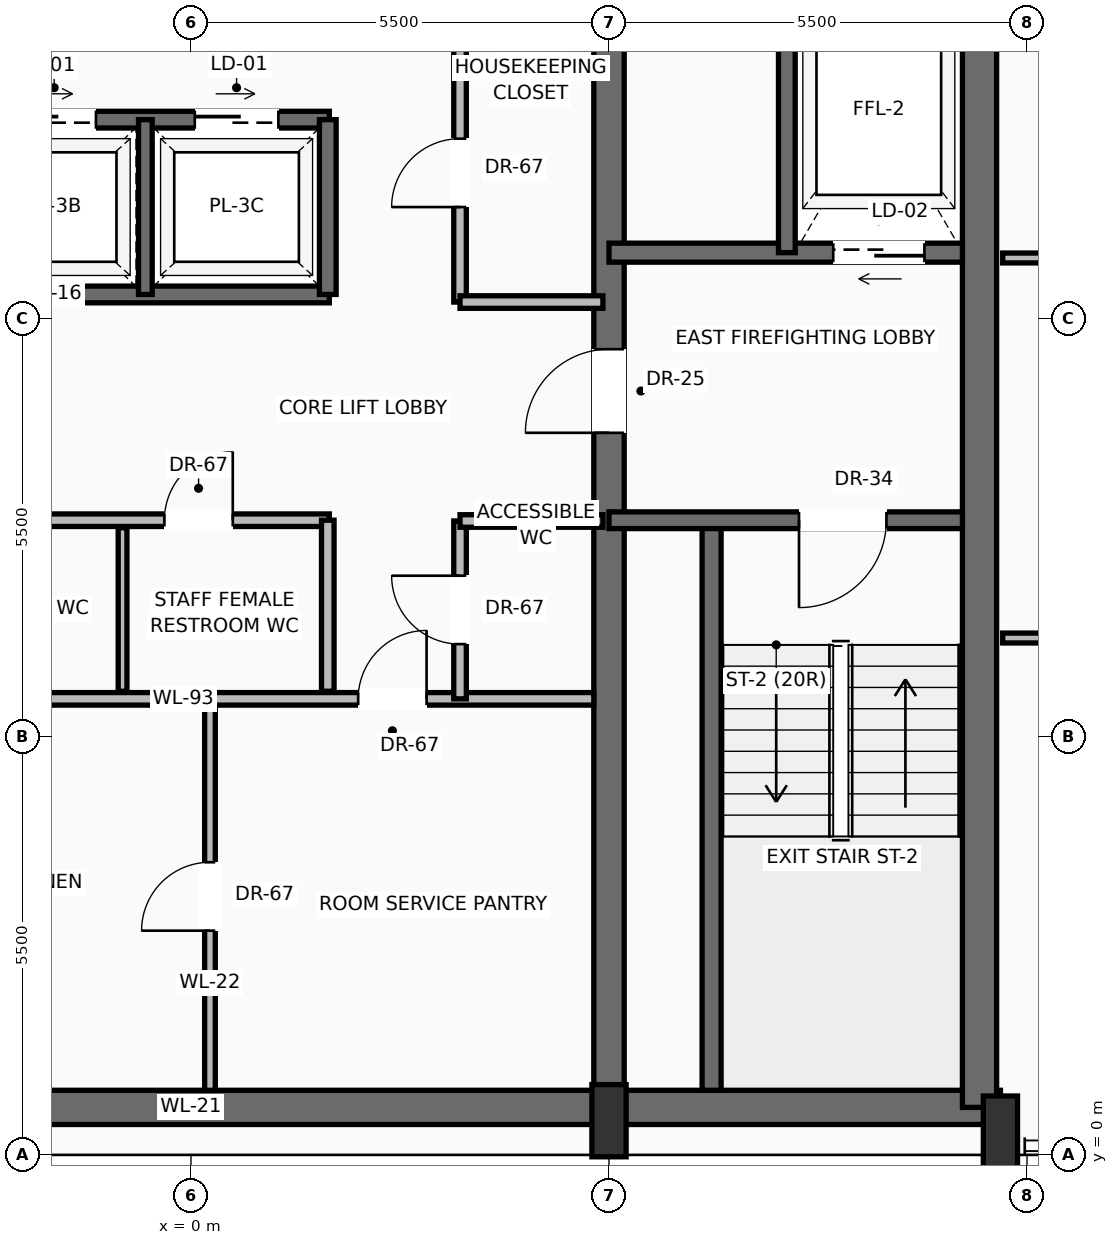
"""IFC4 building model, lengths in metres.
Left out: names, types, materials, properties, quantities, classifications, styles, units other than length and angle.
Written with IfcOpenShell. Run it as: python <this file> out.ifc"""

import sys

from ifc_helpers import new_model, si_unit, direction, frame, frame_2d, origin, origin_2d, place, context, subcontext, project, spatial, rectangle, extrude, source, transform, mapped, element, fill, save


model = new_model("IFC4")
c1 = context("Model", 3, precision=1e-05, world=origin(), true_north=direction((0.0, 1.0)))
c2 = subcontext(c1, "Body", "Model", "MODEL_VIEW")
j1 = project(units=[si_unit("LENGTHUNIT", "METRE"), si_unit("PLANEANGLEUNIT", "RADIAN")], contexts=[c1])
p1 = place(None, origin())
s1 = spatial("IfcSite", under=j1, at=p1, CompositionType="ELEMENT")
p2 = place(p1, origin())
s2 = spatial("IfcBuilding", under=s1, at=p2, CompositionType="ELEMENT")
p3 = place(p2, frame((0.0, 0.0, 286.8)))
s3 = spatial("IfcBuildingStorey", under=s2, at=p3, CompositionType="ELEMENT", Elevation=286.8)
p4 = place(p3, frame((-10.65, 0.625, 0.0), z_axis=(0.0, 0.0, 1.0), x_axis=(1.0, 0.0, 0.0)))
e1 = element("IfcWall", 1, at=p4, inside=s3, PredefinedType="SHEAR", context=c2, shape_type="SweptSolid", body=[
    extrude(rectangle(XDim=21.3, YDim=0.45, at=frame_2d((10.65, 0.0))), origin(), (0.0, 0.0, 1.0), 3.24),
])
p5 = place(p3, frame((10.375, 0.625, 0.0), z_axis=(0.0, 0.0, 1.0), x_axis=(0.0, 1.0, 0.0)))
e2 = element("IfcWall", 2, at=p5, inside=s3, PredefinedType="SHEAR", context=c2, shape_type="SweptSolid", body=[
    extrude(rectangle(XDim=15.35, YDim=0.45, at=frame_2d((7.675, 0.0))), origin(), (0.0, 0.0, 1.0), 3.24),
])
p6 = place(p3, frame((5.5, 0.625, 0.0), z_axis=(0.0, 0.0, 1.0), x_axis=(0.0, 1.0, 0.0)))
e3 = element("IfcWall", 3, at=p6, inside=s3, PredefinedType="SHEAR", context=c2, shape_type="SweptSolid", body=[
    extrude(rectangle(XDim=15.35, YDim=0.4, at=frame_2d((7.675, 0.0))), origin(), (0.0, 0.0, 1.0), 3.24),
])
p7 = place(p6, frame((8.875, 0.0, 0.0)))
e4 = element("IfcOpeningElement", 4, at=p7, cuts=e3, PredefinedType="OPENING", context=c2, shape_type="SweptSolid", body=[
    extrude(rectangle(XDim=1.1, YDim=2.2, at=frame_2d((0.55, 1.1))), frame((0.0, 0.21, 0.0), z_axis=(0.0, -1.0, 0.0), x_axis=(1.0, 0.0, 0.0)), (0.0, 0.0, 1.0), 0.42),
])
m1 = source(origin(), c2, "Body", "SweptSolid", [
    extrude(rectangle(XDim=0.45, YDim=0.95, at=origin_2d()), origin(), (0.0, 0.0, 1.0), 3.45),
])
for number, where, z_axis, x_axis in (
    (5, (5.5, 0.45, 0.0), (0.0, 0.0, 1.0), (1.0, 0.0, 0.0)),
    (6, (10.65, 0.3, 0.0), (0.0, 0.0, 1.0), (1.0, 0.0, 0.0)),
):
    element("IfcColumn", number, at=place(p3, frame(where, z_axis=z_axis, x_axis=x_axis)), inside=s3, PredefinedType="PILASTER", context=c2, shape_type="MappedRepresentation", body=[
        mapped(m1, transform((0.0, 0.0, 0.0), scale=1.0)),
    ])
p8 = place(p3, frame((7.708, 31.656, 0.0), z_axis=(0.0, 0.0, 1.0), x_axis=(0.504292445958, -0.86353293449, 0.0)))
e7 = element("IfcWall", 7, at=p8, inside=s3, PredefinedType="SOLIDWALL", context=c2, shape_type="SweptSolid", body=[
    extrude(rectangle(XDim=20.096, YDim=0.28, at=frame_2d((10.048, 0.0))), origin(), (0.0, 0.0, 1.0), 2.82),
])
p9 = place(p8, frame((4.823, 0.0, 0.0)))
e8 = element("IfcOpeningElement", 8, at=p9, cuts=e7, PredefinedType="OPENING", context=c2, shape_type="SweptSolid", body=[
    extrude(rectangle(XDim=1.6, YDim=2.35, at=frame_2d((0.8, 1.175))), frame((0.0, 0.15, 0.0), z_axis=(0.0, -1.0, 0.0), x_axis=(1.0, 0.0, 0.0)), (0.0, 0.0, 1.0), 0.3),
])
p10 = place(p8, frame((13.666, 0.0, 0.9)))
e9 = element("IfcOpeningElement", 9, at=p10, cuts=e7, PredefinedType="OPENING", context=c2, shape_type="SweptSolid", body=[
    extrude(rectangle(XDim=1.55, YDim=1.75, at=frame_2d((0.775, 0.875))), frame((0.0, 0.15, 0.0), z_axis=(0.0, -1.0, 0.0), x_axis=(1.0, 0.0, 0.0)), (0.0, 0.0, 1.0), 0.3),
])
p11 = place(p3, frame((6.85, 0.85, 0.0), z_axis=(0.0, 0.0, 1.0), x_axis=(0.0, 1.0, 0.0)))
e10 = element("IfcWall", 10, at=p11, inside=s3, PredefinedType="SOLIDWALL", context=c2, shape_type="SweptSolid", body=[
    extrude(rectangle(XDim=7.5, YDim=0.25, at=frame_2d((3.75, 0.0))), origin(), (0.0, 0.0, 1.0), 3.24),
])
p12 = place(p3, frame((10.15, 8.35, 0.0), z_axis=(0.0, 0.0, 1.0), x_axis=(-1.0, 0.0, 0.0)))
e11 = element("IfcWall", 11, at=p12, inside=s3, PredefinedType="SOLIDWALL", context=c2, shape_type="SweptSolid", body=[
    extrude(rectangle(XDim=4.65, YDim=0.22, at=frame_2d((2.325, 0.0))), origin(), (0.0, 0.0, 1.0), 3.24),
])
p13 = place(p12, frame((1.0, 0.0, 0.0)))
e12 = element("IfcOpeningElement", 12, at=p13, cuts=e11, PredefinedType="OPENING", context=c2, shape_type="SweptSolid", body=[
    extrude(rectangle(XDim=1.15, YDim=2.2, at=frame_2d((0.575, 1.1))), frame((0.0, 0.12, 0.0), z_axis=(0.0, -1.0, 0.0), x_axis=(1.0, 0.0, 0.0)), (0.0, 0.0, 1.0), 0.24),
])
p14 = place(p3, frame((10.15, 11.87, 0.0), z_axis=(0.0, 0.0, 1.0), x_axis=(-1.0, 0.0, 0.0)))
e13 = element("IfcWall", 13, at=p14, inside=s3, PredefinedType="SOLIDWALL", context=c2, shape_type="SweptSolid", body=[
    extrude(rectangle(XDim=4.65, YDim=0.25, at=frame_2d((2.325, 0.0))), origin(), (0.0, 0.0, 1.0), 3.24),
])
p15 = place(p14, frame((0.5, 0.0, 0.0)))
e14 = element("IfcOpeningElement", 14, at=p15, cuts=e13, PredefinedType="OPENING", context=c2, shape_type="SweptSolid", body=[
    extrude(rectangle(XDim=1.2, YDim=2.25, at=frame_2d((0.6, 1.125))), frame((0.0, 0.135, 0.0), z_axis=(0.0, -1.0, 0.0), x_axis=(1.0, 0.0, 0.0)), (0.0, 0.0, 1.0), 0.27),
])
p16 = place(p3, frame((7.84, 11.87, 0.0), z_axis=(0.0, 0.0, 1.0), x_axis=(0.0, 1.0, 0.0)))
e15 = element("IfcWall", 15, at=p16, inside=s3, PredefinedType="SOLIDWALL", context=c2, shape_type="SweptSolid", body=[
    extrude(rectangle(XDim=3.88, YDim=0.22, at=frame_2d((1.94, 0.0))), origin(), (0.0, 0.0, 1.0), 3.24),
])
p17 = place(p3, frame((-5.5, 6.0, 0.0), z_axis=(0.0, 0.0, 1.0), x_axis=(1.0, 0.0, 0.0)))
e16 = element("IfcWall", 16, at=p17, inside=s3, PredefinedType="PARTITIONING", context=c2, shape_type="SweptSolid", body=[
    extrude(rectangle(XDim=10.8, YDim=0.165, at=frame_2d((5.4, 0.0))), origin(), (0.0, 0.0, 1.0), 3.232),
])
p18 = place(p17, frame((7.7, 0.0, 0.0)))
e17 = element("IfcOpeningElement", 17, at=p18, cuts=e16, PredefinedType="OPENING", context=c2, shape_type="SweptSolid", body=[
    extrude(rectangle(XDim=0.9, YDim=2.1, at=frame_2d((0.45, 1.05))), frame((0.0, 0.093, 0.0), z_axis=(0.0, -1.0, 0.0), x_axis=(1.0, 0.0, 0.0)), (0.0, 0.0, 1.0), 0.185),
])
p19 = place(p3, frame((0.25, 0.85, 0.0), z_axis=(0.0, 0.0, 1.0), x_axis=(0.0, 1.0, 0.0)))
e18 = element("IfcWall", 18, at=p19, inside=s3, PredefinedType="PARTITIONING", context=c2, shape_type="SweptSolid", body=[
    extrude(rectangle(XDim=5.03, YDim=0.14, at=frame_2d((2.515, 0.0))), origin(), (0.0, 0.0, 1.0), 3.232),
])
p20 = place(p19, frame((2.1, 0.0, 0.0)))
e19 = element("IfcOpeningElement", 19, at=p20, cuts=e18, PredefinedType="OPENING", context=c2, shape_type="SweptSolid", body=[
    extrude(rectangle(XDim=0.9, YDim=2.1, at=frame_2d((0.45, 1.05))), frame((0.0, 0.08, 0.0), z_axis=(0.0, -1.0, 0.0), x_axis=(1.0, 0.0, 0.0)), (0.0, 0.0, 1.0), 0.16),
])
p21 = place(p3, frame((3.54, 6.0, 0.0), z_axis=(0.0, 0.0, 1.0), x_axis=(0.0, 1.0, 0.0)))
e20 = element("IfcWall", 20, at=p21, inside=s3, PredefinedType="PARTITIONING", context=c2, shape_type="SweptSolid", body=[
    extrude(rectangle(XDim=2.34, YDim=0.165, at=frame_2d((1.17, 0.0))), origin(), (0.0, 0.0, 1.0), 3.232),
])
p22 = place(p21, frame((0.72, 0.0, 0.0)))
e21 = element("IfcOpeningElement", 21, at=p22, cuts=e20, PredefinedType="OPENING", context=c2, shape_type="SweptSolid", body=[
    extrude(rectangle(XDim=0.9, YDim=2.1, at=frame_2d((0.45, 1.05))), frame((0.0, 0.093, 0.0), z_axis=(0.0, -1.0, 0.0), x_axis=(1.0, 0.0, 0.0)), (0.0, 0.0, 1.0), 0.185),
])
p23 = place(p3, frame((3.54, 8.34, 0.0), z_axis=(0.0, 0.0, 1.0), x_axis=(1.0, 0.0, 0.0)))
e22 = element("IfcWall", 22, at=p23, inside=s3, PredefinedType="PARTITIONING", context=c2, shape_type="SweptSolid", body=[
    extrude(rectangle(XDim=1.88, YDim=0.165, at=frame_2d((0.94, 0.0))), origin(), (0.0, 0.0, 1.0), 3.232),
])
p24 = place(p3, frame((-5.3, 8.35, 0.0), z_axis=(0.0, 0.0, 1.0), x_axis=(1.0, 0.0, 0.0)))
e23 = element("IfcWall", 23, at=p24, inside=s3, PredefinedType="PARTITIONING", context=c2, shape_type="SweptSolid", body=[
    extrude(rectangle(XDim=7.12, YDim=0.165, at=frame_2d((3.56, 0.0))), origin(), (0.0, 0.0, 1.0), 3.232),
])
p25 = place(p24, frame((0.85, 0.0, 0.0)))
e24 = element("IfcOpeningElement", 24, at=p25, cuts=e23, PredefinedType="OPENING", context=c2, shape_type="SweptSolid", body=[
    extrude(rectangle(XDim=0.9, YDim=2.1, at=frame_2d((0.45, 1.05))), frame((0.0, 0.093, 0.0), z_axis=(0.0, -1.0, 0.0), x_axis=(1.0, 0.0, 0.0)), (0.0, 0.0, 1.0), 0.185),
])
p26 = place(p24, frame((4.95, 0.0, 0.0)))
e25 = element("IfcOpeningElement", 25, at=p26, cuts=e23, PredefinedType="OPENING", context=c2, shape_type="SweptSolid", body=[
    extrude(rectangle(XDim=0.9, YDim=2.1, at=frame_2d((0.45, 1.05))), frame((0.0, 0.093, 0.0), z_axis=(0.0, -1.0, 0.0), x_axis=(1.0, 0.0, 0.0)), (0.0, 0.0, 1.0), 0.185),
])
p27 = place(p3, frame((1.8, 6.1, 0.0), z_axis=(0.0, 0.0, 1.0), x_axis=(0.0, 1.0, 0.0)))
e26 = element("IfcWall", 26, at=p27, inside=s3, PredefinedType="PARTITIONING", context=c2, shape_type="SweptSolid", body=[
    extrude(rectangle(XDim=2.25, YDim=0.165, at=frame_2d((1.125, 0.0))), origin(), (0.0, 0.0, 1.0), 3.232),
])
p28 = place(p3, frame((-0.9, 6.1, 0.0), z_axis=(0.0, 0.0, 1.0), x_axis=(0.0, 1.0, 0.0)))
e27 = element("IfcWall", 27, at=p28, inside=s3, PredefinedType="PARTITIONING", context=c2, shape_type="SweptSolid", body=[
    extrude(rectangle(XDim=2.15, YDim=0.115, at=frame_2d((1.075, 0.0))), origin(), (0.0, 0.0, 1.0), 3.232),
])
p29 = place(p3, frame((-5.5, 11.32, 0.0), z_axis=(0.0, 0.0, 1.0), x_axis=(1.0, 0.0, 0.0)))
e28 = element("IfcWall", 28, at=p29, inside=s3, PredefinedType="SOLIDWALL", context=c2, shape_type="SweptSolid", body=[
    extrude(rectangle(XDim=7.32, YDim=0.22, at=frame_2d((3.66, 0.0))), origin(), (0.0, 0.0, 1.0), 3.24),
])
p30 = place(p3, frame((-5.5, 13.62, 0.0), z_axis=(0.0, 0.0, 1.0), x_axis=(1.0, 0.0, 0.0)))
e29 = element("IfcWall", 29, at=p30, inside=s3, PredefinedType="SOLIDWALL", context=c2, shape_type="SweptSolid", body=[
    extrude(rectangle(XDim=7.32, YDim=0.22, at=frame_2d((3.66, 0.0))), origin(), (0.0, 0.0, 1.0), 3.24),
])
p31 = place(p30, frame((0.75, 0.0, 0.0)))
e30 = element("IfcOpeningElement", 30, at=p31, cuts=e29, PredefinedType="OPENING", context=c2, shape_type="SweptSolid", body=[
    extrude(rectangle(XDim=1.1, YDim=2.2, at=frame_2d((0.55, 1.1))), frame((0.0, 0.12, 0.0), z_axis=(0.0, -1.0, 0.0), x_axis=(1.0, 0.0, 0.0)), (0.0, 0.0, 1.0), 0.24),
])
p32 = place(p30, frame((3.15, 0.0, 0.0)))
e31 = element("IfcOpeningElement", 31, at=p32, cuts=e29, PredefinedType="OPENING", context=c2, shape_type="SweptSolid", body=[
    extrude(rectangle(XDim=1.1, YDim=2.2, at=frame_2d((0.55, 1.1))), frame((0.0, 0.12, 0.0), z_axis=(0.0, -1.0, 0.0), x_axis=(1.0, 0.0, 0.0)), (0.0, 0.0, 1.0), 0.24),
])
p33 = place(p30, frame((5.55, 0.0, 0.0)))
e32 = element("IfcOpeningElement", 32, at=p33, cuts=e29, PredefinedType="OPENING", context=c2, shape_type="SweptSolid", body=[
    extrude(rectangle(XDim=1.1, YDim=2.2, at=frame_2d((0.55, 1.1))), frame((0.0, 0.12, 0.0), z_axis=(0.0, -1.0, 0.0), x_axis=(1.0, 0.0, 0.0)), (0.0, 0.0, 1.0), 0.24),
])
p34 = place(p3, frame((1.8, 11.32, 0.0), z_axis=(0.0, 0.0, 1.0), x_axis=(0.0, 1.0, 0.0)))
e33 = element("IfcWall", 33, at=p34, inside=s3, PredefinedType="SOLIDWALL", context=c2, shape_type="SweptSolid", body=[
    extrude(rectangle(XDim=2.3, YDim=0.22, at=frame_2d((1.15, 0.0))), origin(), (0.0, 0.0, 1.0), 3.24),
])
p35 = place(p3, frame((-0.6, 11.32, 0.0), z_axis=(0.0, 0.0, 1.0), x_axis=(0.0, 1.0, 0.0)))
e34 = element("IfcWall", 34, at=p35, inside=s3, PredefinedType="SOLIDWALL", context=c2, shape_type="SweptSolid", body=[
    extrude(rectangle(XDim=2.3, YDim=0.18, at=frame_2d((1.15, 0.0))), origin(), (0.0, 0.0, 1.0), 3.24),
])
p36 = place(p3, frame((3.54, 11.22, 0.0), z_axis=(0.0, 0.0, 1.0), x_axis=(0.0, 1.0, 0.0)))
e35 = element("IfcWall", 35, at=p36, inside=s3, PredefinedType="PARTITIONING", context=c2, shape_type="SweptSolid", body=[
    extrude(rectangle(XDim=4.53, YDim=0.165, at=frame_2d((2.265, 0.0))), origin(), (0.0, 0.0, 1.0), 3.232),
])
p37 = place(p36, frame((1.25, 0.0, 0.0)))
e36 = element("IfcOpeningElement", 36, at=p37, cuts=e35, PredefinedType="OPENING", context=c2, shape_type="SweptSolid", body=[
    extrude(rectangle(XDim=0.9, YDim=2.1, at=frame_2d((0.45, 1.05))), frame((0.0, 0.093, 0.0), z_axis=(0.0, -1.0, 0.0), x_axis=(1.0, 0.0, 0.0)), (0.0, 0.0, 1.0), 0.185),
])
p38 = place(p3, frame((3.54, 11.22, 0.0), z_axis=(0.0, 0.0, 1.0), x_axis=(1.0, 0.0, 0.0)))
e37 = element("IfcWall", 37, at=p38, inside=s3, PredefinedType="PARTITIONING", context=c2, shape_type="SweptSolid", body=[
    extrude(rectangle(XDim=1.88, YDim=0.165, at=frame_2d((0.94, 0.0))), origin(), (0.0, 0.0, 1.0), 3.232),
])
p39 = place(p3, frame((10.68, 6.8, 0.0), z_axis=(0.0, 0.0, 1.0), x_axis=(1.0, 0.0, 0.0)))
e38 = element("IfcWall", 38, at=p39, inside=s3, PredefinedType="PARTITIONING", context=c2, shape_type="SweptSolid", body=[
    extrude(rectangle(XDim=11.695, YDim=0.13, at=frame_2d((5.847, 0.0))), origin(), (0.0, 0.0, 1.0), 3.232),
])
p40 = place(p39, frame((4.822, 0.0, 0.0)))
e39 = element("IfcOpeningElement", 39, at=p40, cuts=e38, PredefinedType="OPENING", context=c2, shape_type="SweptSolid", body=[
    extrude(rectangle(XDim=0.95, YDim=2.2, at=frame_2d((0.475, 1.1))), frame((0.0, 0.075, 0.0), z_axis=(0.0, -1.0, 0.0), x_axis=(1.0, 0.0, 0.0)), (0.0, 0.0, 1.0), 0.15),
])
p41 = place(p3, frame((10.68, 11.8, 0.0), z_axis=(0.0, 0.0, 1.0), x_axis=(1.0, 0.0, 0.0)))
e40 = element("IfcWall", 40, at=p41, inside=s3, PredefinedType="PARTITIONING", context=c2, shape_type="SweptSolid", body=[
    extrude(rectangle(XDim=8.774, YDim=0.13, at=frame_2d((4.387, 0.0))), origin(), (0.0, 0.0, 1.0), 3.232),
])
p42 = place(p41, frame((3.508, 0.0, 0.0)))
e41 = element("IfcOpeningElement", 41, at=p42, cuts=e40, PredefinedType="OPENING", context=c2, shape_type="SweptSolid", body=[
    extrude(rectangle(XDim=0.95, YDim=2.2, at=frame_2d((0.475, 1.1))), frame((0.0, 0.075, 0.0), z_axis=(0.0, -1.0, 0.0), x_axis=(1.0, 0.0, 0.0)), (0.0, 0.0, 1.0), 0.15),
])
m2 = source(origin(), c2, "Body", "SweptSolid", [
    extrude(rectangle(XDim=1.15, YDim=2.2, at=frame_2d((0.575, 1.1))), frame((0.0, 0.025, 0.0), z_axis=(0.0, -1.0, 0.0), x_axis=(1.0, 0.0, 0.0)), (0.0, 0.0, 1.0), 0.05),
])
p43 = place(p13, origin())
e42 = element("IfcDoor", 42, at=p43, inside=s3, OperationType="SINGLE_SWING_RIGHT", PredefinedType="DOOR", context=c2, shape_type="MappedRepresentation", body=[
    mapped(m2, transform((0.0, 0.0, 0.0), scale=1.0)),
])
fill(e12, e42)
m3 = source(origin(), c2, "Body", "SweptSolid", [
    extrude(rectangle(XDim=1.1, YDim=2.2, at=frame_2d((0.55, 1.1))), frame((0.0, 0.025, 0.0), z_axis=(0.0, -1.0, 0.0), x_axis=(1.0, 0.0, 0.0)), (0.0, 0.0, 1.0), 0.05),
])
p44 = place(p7, origin())
e43 = element("IfcDoor", 43, at=p44, inside=s3, OperationType="SINGLE_SWING_LEFT", PredefinedType="DOOR", context=c2, shape_type="MappedRepresentation", body=[
    mapped(m3, transform((0.0, 0.0, 0.0), scale=1.0)),
])
fill(e4, e43)
m4 = source(origin(), c2, "Body", "SweptSolid", [
    extrude(rectangle(XDim=1.2, YDim=2.25, at=frame_2d((0.6, 1.125))), frame((0.0, 0.025, 0.0), z_axis=(0.0, -1.0, 0.0), x_axis=(1.0, 0.0, 0.0)), (0.0, 0.0, 1.0), 0.05),
])
p45 = place(p15, origin())
e44 = element("IfcDoor", 44, at=p45, inside=s3, OperationType="SLIDING_TO_RIGHT", PredefinedType="DOOR", context=c2, shape_type="MappedRepresentation", body=[
    mapped(m4, transform((0.0, 0.0, 0.0), scale=1.0)),
])
fill(e14, e44)
m5 = source(origin(), c2, "Body", "SweptSolid", [
    extrude(rectangle(XDim=0.9, YDim=2.1, at=frame_2d((0.45, 1.05))), frame((0.0, 0.025, 0.0), z_axis=(0.0, -1.0, 0.0), x_axis=(1.0, 0.0, 0.0)), (0.0, 0.0, 1.0), 0.05),
])
p46 = place(p18, origin())
e45 = element("IfcDoor", 45, at=p46, inside=s3, OperationType="SINGLE_SWING_RIGHT", PredefinedType="DOOR", context=c2, shape_type="MappedRepresentation", body=[
    mapped(m5, transform((0.0, 0.0, 0.0), scale=1.0)),
])
fill(e17, e45)
p47 = place(p20, origin())
e46 = element("IfcDoor", 46, at=p47, inside=s3, OperationType="SINGLE_SWING_LEFT", PredefinedType="DOOR", context=c2, shape_type="MappedRepresentation", body=[
    mapped(m5, transform((0.0, 0.0, 0.0), scale=1.0)),
])
fill(e19, e46)
p48 = place(p22, origin())
e47 = element("IfcDoor", 47, at=p48, inside=s3, OperationType="SINGLE_SWING_RIGHT", PredefinedType="DOOR", context=c2, shape_type="MappedRepresentation", body=[
    mapped(m5, transform((0.0, 0.0, 0.0), scale=1.0)),
])
fill(e21, e47)
p49 = place(p26, origin())
e48 = element("IfcDoor", 48, at=p49, inside=s3, OperationType="SINGLE_SWING_RIGHT", PredefinedType="DOOR", context=c2, shape_type="MappedRepresentation", body=[
    mapped(m5, transform((0.0, 0.0, 0.0), scale=1.0)),
])
fill(e25, e48)
m6 = source(origin(), c2, "Body", "SweptSolid", [
    extrude(rectangle(XDim=1.1, YDim=2.2, at=frame_2d((0.55, 1.1))), frame((0.0, 0.025, 0.0), z_axis=(0.0, -1.0, 0.0), x_axis=(1.0, 0.0, 0.0)), (0.0, 0.0, 1.0), 0.05),
])
p50 = place(p32, origin())
e49 = element("IfcDoor", 49, at=p50, inside=s3, OperationType="SLIDING_TO_RIGHT", PredefinedType="DOOR", context=c2, shape_type="MappedRepresentation", body=[
    mapped(m6, transform((0.0, 0.0, 0.0), scale=1.0)),
])
fill(e31, e49)
p51 = place(p33, origin())
e50 = element("IfcDoor", 50, at=p51, inside=s3, OperationType="SLIDING_TO_RIGHT", PredefinedType="DOOR", context=c2, shape_type="MappedRepresentation", body=[
    mapped(m6, transform((0.0, 0.0, 0.0), scale=1.0)),
])
fill(e32, e50)
p52 = place(p37, origin())
e51 = element("IfcDoor", 51, at=p52, inside=s3, OperationType="SINGLE_SWING_LEFT", PredefinedType="DOOR", context=c2, shape_type="MappedRepresentation", body=[
    mapped(m5, transform((0.0, 0.0, 0.0), scale=1.0)),
])
fill(e36, e51)
save(model, sys.argv[1])
